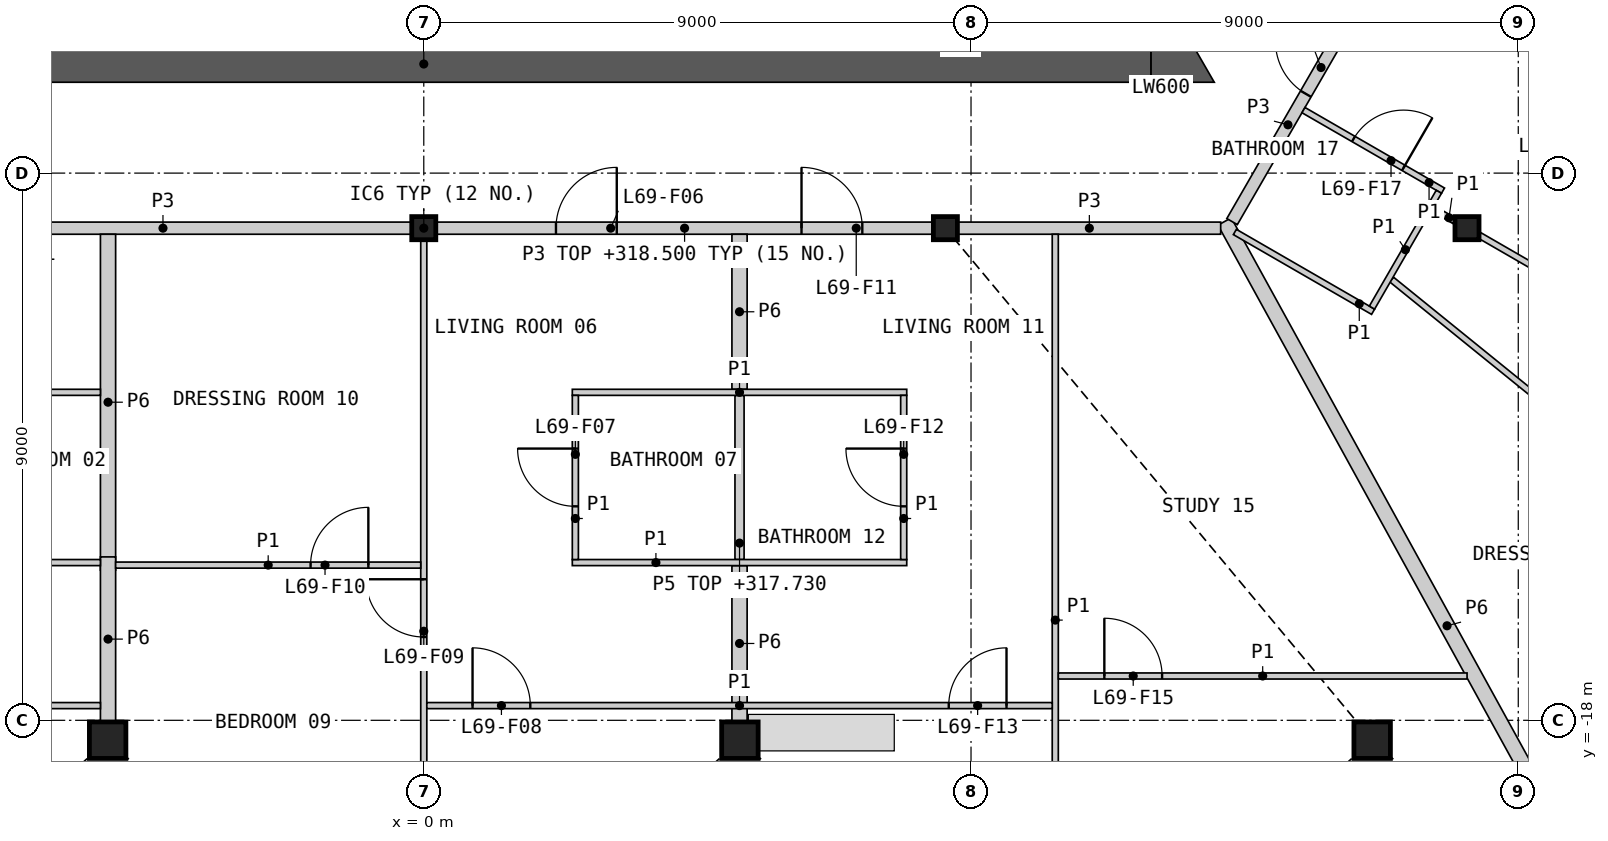
"""IFC4 building model, lengths in metres.
Left out: names, types, materials, properties, quantities, classifications, styles, units other than length and angle.
Written with IfcOpenShell. Run it as: python <this file> out.ifc"""

import sys

from ifc_helpers import new_model, si_unit, direction, frame, frame_2d, origin, origin_2d, place, context, subcontext, project, spatial, polyline, rectangle, hollow_rectangle, i_section, outline, extrude, element, fill, save


model = new_model("IFC4")
c1 = context("Model", 3, precision=1e-05, world=origin(), true_north=direction((0.0, 1.0)))
c2 = subcontext(c1, "Body", "Model", "MODEL_VIEW")
j1 = project(units=[si_unit("LENGTHUNIT", "METRE"), si_unit("PLANEANGLEUNIT", "RADIAN")], contexts=[c1])
p1 = place(None, origin())
s1 = spatial("IfcSite", under=j1, at=p1, CompositionType="ELEMENT")
p2 = place(p1, origin())
s2 = spatial("IfcBuilding", under=s1, at=p2, CompositionType="ELEMENT")
p3 = place(p2, frame((0.0, 0.0, 315.4)))
s3 = spatial("IfcBuildingStorey", under=s2, at=p3, CompositionType="ELEMENT", Elevation=315.4)
for number, where, z_axis, x_axis in (
    (1, (-5.199, -18.327, 0.0), (0.0, 0.0, 1.0), (1.0, 0.0, 0.0)),
    (2, (5.199, -18.327, 0.0), (0.0, 0.0, 1.0), (1.0, 0.0, 0.0)),
    (3, (15.597, -18.327, 0.0), (0.0, 0.0, 1.0), (1.0, 0.0, 0.0)),
):
    element("IfcColumn", number, at=place(p3, frame(where, z_axis=z_axis, x_axis=x_axis)), inside=s3, PredefinedType="COLUMN", context=c2, shape_type="SweptSolid", body=[
        extrude(hollow_rectangle(XDim=0.6, YDim=0.6, WallThickness=0.04, at=origin_2d()), origin(), (0.0, 0.0, 1.0), 3.4),
    ])
for number, where, z_axis, x_axis in (
    (4, (0.0, -9.906, 0.0), (0.0, 0.0, 1.0), (1.0, 0.0, 0.0)),
    (5, (8.578, -9.906, 0.0), (0.0, 0.0, 1.0), (1.0, 0.0, 0.0)),
    (6, (17.157, -9.906, 0.0), (0.0, 0.0, 1.0), (1.0, 0.0, 0.0)),
):
    element("IfcColumn", number, at=place(p3, frame(where, z_axis=z_axis, x_axis=x_axis)), inside=s3, PredefinedType="COLUMN", context=c2, shape_type="SweptSolid", body=[
        extrude(i_section(OverallWidth=0.396, OverallDepth=0.381, WebThickness=0.019, FlangeThickness=0.03, at=origin_2d()), origin(), (0.0, 0.0, 1.0), 3.4),
    ])
p4 = place(p3, frame((-11.961, -7.206, 0.0), z_axis=(0.0, 0.0, 1.0), x_axis=(1.0, 0.0, 0.0)))
e7 = element("IfcWall", 7, at=p4, inside=s3, PredefinedType="SHEAR", context=c2, shape_type="SweptSolid", body=[
    extrude(rectangle(XDim=23.921, YDim=0.6, at=frame_2d((11.961, 0.0))), origin(), (0.0, 0.0, 1.0), 3.1),
])
p5 = place(p3, origin())
e8 = element("IfcWall", 8, at=p5, inside=s3, PredefinedType="SHEAR", context=c2, shape_type="SweptSolid", body=[
    extrude(outline(polyline([(11.961, -7.506), (11.961, -6.906), (12.48, -6.606), (13.0, -7.506), (11.961, -7.506)])), origin(), (0.0, 0.0, 1.0), 3.1),
])
p6 = place(p3, frame((13.171, -9.796, 0.0), z_axis=(0.0, 0.0, 1.0), x_axis=(0.481999020381, -0.876171755053, 0.0)))
e9 = element("IfcWall", 9, at=p6, inside=s3, PredefinedType="PARTITIONING", context=c2, shape_type="SweptSolid", body=[
    extrude(rectangle(XDim=15.178, YDim=0.25, at=frame_2d((7.589, 0.0))), origin(), (0.0, 0.0, 1.0), 2.33),
])
p7 = place(p3, frame((0.208, -9.906, 0.0), z_axis=(0.0, 0.0, 1.0), x_axis=(1.0, 0.0, 0.0)))
e10 = element("IfcWall", 10, at=p7, inside=s3, PredefinedType="PARTITIONING", context=c2, shape_type="SweptSolid", body=[
    extrude(rectangle(XDim=8.163, YDim=0.2, at=frame_2d((4.082, 0.0))), origin(), (0.0, 0.0, 1.0), 3.1),
])
p8 = place(p7, frame((1.966, 0.0, 0.0)))
e11 = element("IfcOpeningElement", 11, at=p8, cuts=e10, PredefinedType="OPENING", context=c2, shape_type="SweptSolid", body=[
    extrude(rectangle(XDim=1.0, YDim=2.1, at=frame_2d((0.5, 1.05))), frame((0.0, 0.11, 0.0), z_axis=(0.0, -1.0, 0.0), x_axis=(1.0, 0.0, 0.0)), (0.0, 0.0, 1.0), 0.22),
])
p9 = place(p7, frame((6.004, 0.0, 0.0)))
e12 = element("IfcOpeningElement", 12, at=p9, cuts=e10, PredefinedType="OPENING", context=c2, shape_type="SweptSolid", body=[
    extrude(rectangle(XDim=1.0, YDim=2.1, at=frame_2d((0.5, 1.05))), frame((0.0, 0.11, 0.0), z_axis=(0.0, -1.0, 0.0), x_axis=(1.0, 0.0, 0.0)), (0.0, 0.0, 1.0), 0.22),
])
p10 = place(p3, frame((-8.371, -9.906, 0.0), z_axis=(0.0, 0.0, 1.0), x_axis=(1.0, 0.0, 0.0)))
e13 = element("IfcWall", 13, at=p10, inside=s3, PredefinedType="PARTITIONING", context=c2, shape_type="SweptSolid", body=[
    extrude(rectangle(XDim=8.163, YDim=0.2, at=frame_2d((4.082, 0.0))), origin(), (0.0, 0.0, 1.0), 3.1),
])
p11 = place(p10, frame((1.159, 0.0, 0.0)))
e14 = element("IfcOpeningElement", 14, at=p11, cuts=e13, PredefinedType="OPENING", context=c2, shape_type="SweptSolid", body=[
    extrude(rectangle(XDim=1.0, YDim=2.1, at=frame_2d((0.5, 1.05))), frame((0.0, 0.11, 0.0), z_axis=(0.0, -1.0, 0.0), x_axis=(1.0, 0.0, 0.0)), (0.0, 0.0, 1.0), 0.22),
])
p12 = place(p3, frame((-5.193, -15.531, 0.0), z_axis=(0.0, 0.0, 1.0), x_axis=(0.0, 1.0, 0.0)))
e15 = element("IfcWall", 15, at=p12, inside=s3, PredefinedType="PARTITIONING", context=c2, shape_type="SweptSolid", body=[
    extrude(rectangle(XDim=5.525, YDim=0.25, at=frame_2d((2.762, 0.0))), origin(), (0.0, 0.0, 1.0), 2.33),
])
p13 = place(p3, frame((8.786, -9.906, 0.0), z_axis=(0.0, 0.0, 1.0), x_axis=(1.0, 0.0, 0.0)))
e16 = element("IfcWall", 16, at=p13, inside=s3, PredefinedType="PARTITIONING", context=c2, shape_type="SweptSolid", body=[
    extrude(rectangle(XDim=4.32, YDim=0.2, at=frame_2d((2.16, 0.0))), origin(), (0.0, 0.0, 1.0), 3.1),
])
p14 = place(p3, frame((13.293, -9.797, 0.0), z_axis=(0.0, 0.0, 1.0), x_axis=(0.499967746641, 0.866044024469, 0.0)))
e17 = element("IfcWall", 17, at=p14, inside=s3, PredefinedType="PARTITIONING", context=c2, shape_type="SweptSolid", body=[
    extrude(rectangle(XDim=3.676, YDim=0.2, at=frame_2d((1.838, 0.0))), origin(), (0.0, 0.0, 1.0), 3.1),
])
p15 = place(p14, frame((2.426, 0.0, 0.0)))
e18 = element("IfcOpeningElement", 18, at=p15, cuts=e17, PredefinedType="OPENING", context=c2, shape_type="SweptSolid", body=[
    extrude(rectangle(XDim=1.0, YDim=2.1, at=frame_2d((0.5, 1.05))), frame((0.0, 0.11, 0.0), z_axis=(0.0, -1.0, 0.0), x_axis=(1.0, 0.0, 0.0)), (0.0, 0.0, 1.0), 0.22),
])
p16 = place(p3, frame((5.193, -12.556, 0.0), z_axis=(0.0, 0.0, 1.0), x_axis=(0.0, 1.0, 0.0)))
e19 = element("IfcWall", 19, at=p16, inside=s3, PredefinedType="PARTITIONING", context=c2, shape_type="SweptSolid", body=[
    extrude(rectangle(XDim=2.55, YDim=0.25, at=frame_2d((1.275, 0.0))), origin(), (0.0, 0.0, 1.0), 2.33),
])
p17 = place(p3, frame((5.193, -18.017, 0.0), z_axis=(0.0, 0.0, 1.0), x_axis=(0.0, 1.0, 0.0)))
e20 = element("IfcWall", 20, at=p17, inside=s3, PredefinedType="PARTITIONING", context=c2, shape_type="SweptSolid", body=[
    extrude(rectangle(XDim=2.561, YDim=0.25, at=frame_2d((1.281, 0.0))), origin(), (0.0, 0.0, 1.0), 2.33),
])
p18 = place(p3, frame((-5.193, -18.017, 0.0), z_axis=(0.0, 0.0, 1.0), x_axis=(0.0, 1.0, 0.0)))
e21 = element("IfcWall", 21, at=p18, inside=s3, PredefinedType="PARTITIONING", context=c2, shape_type="SweptSolid", body=[
    extrude(rectangle(XDim=2.705, YDim=0.25, at=frame_2d((1.352, 0.0))), origin(), (0.0, 0.0, 1.0), 2.33),
])
p19 = place(p3, frame((5.193, -15.356, 0.0), z_axis=(0.0, 0.0, 1.0), x_axis=(0.0, 1.0, 0.0)))
e22 = element("IfcWall", 22, at=p19, inside=s3, PredefinedType="PLUMBINGWALL", context=c2, shape_type="SweptSolid", body=[
    extrude(rectangle(XDim=2.7, YDim=0.15, at=frame_2d((1.35, 0.0))), origin(), (0.0, 0.0, 1.0), 2.33),
])
p20 = place(p3, frame((15.917, -10.751, 0.0), z_axis=(0.0, 0.0, 1.0), x_axis=(0.777149866095, -0.629315569193, 0.0)))
e23 = element("IfcWall", 23, at=p20, inside=s3, PredefinedType="PARTITIONING", context=c2, shape_type="SweptSolid", body=[
    extrude(rectangle(XDim=12.927, YDim=0.1, at=frame_2d((6.464, 0.0))), origin(), (0.0, 0.0, 1.0), 2.33),
])
p21 = place(p20, frame((7.298, 0.0, 0.0)))
e24 = element("IfcOpeningElement", 24, at=p21, cuts=e23, PredefinedType="OPENING", context=c2, shape_type="SweptSolid", body=[
    extrude(rectangle(XDim=0.95, YDim=2.1, at=frame_2d((0.475, 1.05))), frame((0.0, 0.06, 0.0), z_axis=(0.0, -1.0, 0.0), x_axis=(1.0, 0.0, 0.0)), (0.0, 0.0, 1.0), 0.12),
])
p22 = place(p3, frame((10.385, -22.698, 0.0), z_axis=(0.0, 0.0, 1.0), x_axis=(0.0, 1.0, 0.0)))
e25 = element("IfcWall", 25, at=p22, inside=s3, PredefinedType="PARTITIONING", context=c2, shape_type="SweptSolid", body=[
    extrude(rectangle(XDim=12.692, YDim=0.1, at=frame_2d((6.346, 0.0))), origin(), (0.0, 0.0, 1.0), 2.33),
])
p23 = place(p22, frame((1.153, 0.0, 0.0)))
e26 = element("IfcOpeningElement", 26, at=p23, cuts=e25, PredefinedType="OPENING", context=c2, shape_type="SweptSolid", body=[
    extrude(rectangle(XDim=0.95, YDim=2.1, at=frame_2d((0.475, 1.05))), frame((0.0, 0.06, 0.0), z_axis=(0.0, -1.0, 0.0), x_axis=(1.0, 0.0, 0.0)), (0.0, 0.0, 1.0), 0.12),
])
p24 = place(p3, frame((0.0, -22.698, 0.0), z_axis=(0.0, 0.0, 1.0), x_axis=(0.0, 1.0, 0.0)))
e27 = element("IfcWall", 27, at=p24, inside=s3, PredefinedType="PARTITIONING", context=c2, shape_type="SweptSolid", body=[
    extrude(rectangle(XDim=12.585, YDim=0.1, at=frame_2d((6.292, 0.0))), origin(), (0.0, 0.0, 1.0), 2.33),
])
p25 = place(p24, frame((6.068, 0.0, 0.0)))
e28 = element("IfcOpeningElement", 28, at=p25, cuts=e27, PredefinedType="OPENING", context=c2, shape_type="SweptSolid", body=[
    extrude(rectangle(XDim=0.95, YDim=2.1, at=frame_2d((0.475, 1.05))), frame((0.0, 0.06, 0.0), z_axis=(0.0, -1.0, 0.0), x_axis=(1.0, 0.0, 0.0)), (0.0, 0.0, 1.0), 0.12),
])
p26 = place(p3, frame((17.365, -10.025, 0.0), z_axis=(0.0, 0.0, 1.0), x_axis=(0.866021046153, -0.500007547564, 0.0)))
e29 = element("IfcWall", 29, at=p26, inside=s3, PredefinedType="PARTITIONING", context=c2, shape_type="SweptSolid", body=[
    extrude(rectangle(XDim=11.267, YDim=0.1, at=frame_2d((5.634, 0.0))), origin(), (0.0, 0.0, 1.0), 2.33),
])
p27 = place(p26, frame((8.364, 0.0, 0.0)))
e30 = element("IfcOpeningElement", 30, at=p27, cuts=e29, PredefinedType="OPENING", context=c2, shape_type="SweptSolid", body=[
    extrude(rectangle(XDim=0.95, YDim=2.1, at=frame_2d((0.475, 1.05))), frame((0.0, 0.06, 0.0), z_axis=(0.0, -1.0, 0.0), x_axis=(1.0, 0.0, 0.0)), (0.0, 0.0, 1.0), 0.12),
])
p28 = place(p3, frame((0.05, -17.758, 0.0), z_axis=(0.0, 0.0, 1.0), x_axis=(1.0, 0.0, 0.0)))
e31 = element("IfcWall", 31, at=p28, inside=s3, PredefinedType="PARTITIONING", context=c2, shape_type="SweptSolid", body=[
    extrude(rectangle(XDim=10.286, YDim=0.1, at=frame_2d((5.143, 0.0))), origin(), (0.0, 0.0, 1.0), 2.33),
])
p29 = place(p28, frame((0.752, 0.0, 0.0)))
e32 = element("IfcOpeningElement", 32, at=p29, cuts=e31, PredefinedType="OPENING", context=c2, shape_type="SweptSolid", body=[
    extrude(rectangle(XDim=0.95, YDim=2.1, at=frame_2d((0.475, 1.05))), frame((0.0, 0.06, 0.0), z_axis=(0.0, -1.0, 0.0), x_axis=(1.0, 0.0, 0.0)), (0.0, 0.0, 1.0), 0.12),
])
p30 = place(p28, frame((8.584, 0.0, 0.0)))
e33 = element("IfcOpeningElement", 33, at=p30, cuts=e31, PredefinedType="OPENING", context=c2, shape_type="SweptSolid", body=[
    extrude(rectangle(XDim=0.95, YDim=2.1, at=frame_2d((0.475, 1.05))), frame((0.0, 0.06, 0.0), z_axis=(0.0, -1.0, 0.0), x_axis=(1.0, 0.0, 0.0)), (0.0, 0.0, 1.0), 0.12),
])
p31 = place(p3, frame((10.436, -17.271, 0.0), z_axis=(0.0, 0.0, 1.0), x_axis=(1.0, 0.0, 0.0)))
e34 = element("IfcWall", 34, at=p31, inside=s3, PredefinedType="PARTITIONING", context=c2, shape_type="SweptSolid", body=[
    extrude(rectangle(XDim=6.722, YDim=0.1, at=frame_2d((3.361, 0.0))), origin(), (0.0, 0.0, 1.0), 2.33),
])
p32 = place(p31, frame((0.757, 0.0, 0.0)))
e35 = element("IfcOpeningElement", 35, at=p32, cuts=e34, PredefinedType="OPENING", context=c2, shape_type="SweptSolid", body=[
    extrude(rectangle(XDim=0.95, YDim=2.1, at=frame_2d((0.475, 1.05))), frame((0.0, 0.06, 0.0), z_axis=(0.0, -1.0, 0.0), x_axis=(1.0, 0.0, 0.0)), (0.0, 0.0, 1.0), 0.12),
])
for number, where, z_axis, x_axis in (
    (36, (2.443, -12.606, 0.0), (0.0, 0.0, 1.0), (1.0, 0.0, 0.0)),
    (37, (2.443, -15.406, 0.0), (0.0, 0.0, 1.0), (1.0, 0.0, 0.0)),
):
    element("IfcWall", number, at=place(p3, frame(where, z_axis=z_axis, x_axis=x_axis)), inside=s3, PredefinedType="PARTITIONING", context=c2, shape_type="SweptSolid", body=[
        extrude(rectangle(XDim=5.5, YDim=0.1, at=frame_2d((2.75, 0.0))), origin(), (0.0, 0.0, 1.0), 2.33),
    ])
p33 = place(p3, frame((-10.336, -17.758, 0.0), z_axis=(0.0, 0.0, 1.0), x_axis=(1.0, 0.0, 0.0)))
e38 = element("IfcWall", 38, at=p33, inside=s3, PredefinedType="PARTITIONING", context=c2, shape_type="SweptSolid", body=[
    extrude(rectangle(XDim=5.018, YDim=0.1, at=frame_2d((2.509, 0.0))), origin(), (0.0, 0.0, 1.0), 2.33),
])
p34 = place(p33, frame((0.76, 0.0, 0.0)))
e39 = element("IfcOpeningElement", 39, at=p34, cuts=e38, PredefinedType="OPENING", context=c2, shape_type="SweptSolid", body=[
    extrude(rectangle(XDim=0.95, YDim=2.1, at=frame_2d((0.475, 1.05))), frame((0.0, 0.06, 0.0), z_axis=(0.0, -1.0, 0.0), x_axis=(1.0, 0.0, 0.0)), (0.0, 0.0, 1.0), 0.12),
])
p35 = place(p3, frame((-5.068, -15.447, 0.0), z_axis=(0.0, 0.0, 1.0), x_axis=(1.0, 0.0, 0.0)))
e40 = element("IfcWall", 40, at=p35, inside=s3, PredefinedType="PARTITIONING", context=c2, shape_type="SweptSolid", body=[
    extrude(rectangle(XDim=5.018, YDim=0.1, at=frame_2d((2.509, 0.0))), origin(), (0.0, 0.0, 1.0), 2.33),
])
p36 = place(p35, frame((3.206, 0.0, 0.0)))
e41 = element("IfcOpeningElement", 41, at=p36, cuts=e40, PredefinedType="OPENING", context=c2, shape_type="SweptSolid", body=[
    extrude(rectangle(XDim=0.95, YDim=2.1, at=frame_2d((0.475, 1.05))), frame((0.0, 0.06, 0.0), z_axis=(0.0, -1.0, 0.0), x_axis=(1.0, 0.0, 0.0)), (0.0, 0.0, 1.0), 0.12),
])
p37 = place(p3, frame((2.493, -15.356, 0.0), z_axis=(0.0, 0.0, 1.0), x_axis=(0.0, 1.0, 0.0)))
e42 = element("IfcWall", 42, at=p37, inside=s3, PredefinedType="PARTITIONING", context=c2, shape_type="SweptSolid", body=[
    extrude(rectangle(XDim=2.7, YDim=0.1, at=frame_2d((1.35, 0.0))), origin(), (0.0, 0.0, 1.0), 2.33),
])
p38 = place(p37, frame((0.875, 0.0, 0.0)))
e43 = element("IfcOpeningElement", 43, at=p38, cuts=e42, PredefinedType="OPENING", context=c2, shape_type="SweptSolid", body=[
    extrude(rectangle(XDim=0.95, YDim=2.1, at=frame_2d((0.475, 1.05))), frame((0.0, 0.06, 0.0), z_axis=(0.0, -1.0, 0.0), x_axis=(1.0, 0.0, 0.0)), (0.0, 0.0, 1.0), 0.12),
])
p39 = place(p3, frame((7.893, -15.356, 0.0), z_axis=(0.0, 0.0, 1.0), x_axis=(0.0, 1.0, 0.0)))
e44 = element("IfcWall", 44, at=p39, inside=s3, PredefinedType="PARTITIONING", context=c2, shape_type="SweptSolid", body=[
    extrude(rectangle(XDim=2.7, YDim=0.1, at=frame_2d((1.35, 0.0))), origin(), (0.0, 0.0, 1.0), 2.33),
])
p40 = place(p39, frame((0.875, 0.0, 0.0)))
e45 = element("IfcOpeningElement", 45, at=p40, cuts=e44, PredefinedType="OPENING", context=c2, shape_type="SweptSolid", body=[
    extrude(rectangle(XDim=0.95, YDim=2.1, at=frame_2d((0.475, 1.05))), frame((0.0, 0.06, 0.0), z_axis=(0.0, -1.0, 0.0), x_axis=(1.0, 0.0, 0.0)), (0.0, 0.0, 1.0), 0.12),
])
p41 = place(p3, frame((14.468, -7.964, 0.0), z_axis=(0.0, 0.0, 1.0), x_axis=(0.865989200783, -0.500062700197, 0.0)))
e46 = element("IfcWall", 46, at=p41, inside=s3, PredefinedType="PARTITIONING", context=c2, shape_type="SweptSolid", body=[
    extrude(rectangle(XDim=2.65, YDim=0.1, at=frame_2d((1.325, 0.0))), origin(), (0.0, 0.0, 1.0), 2.33),
])
p42 = place(p41, frame((0.95, 0.0, 0.0)))
e47 = element("IfcOpeningElement", 47, at=p42, cuts=e46, PredefinedType="OPENING", context=c2, shape_type="SweptSolid", body=[
    extrude(rectangle(XDim=0.95, YDim=2.1, at=frame_2d((0.475, 1.05))), frame((0.0, 0.06, 0.0), z_axis=(0.0, -1.0, 0.0), x_axis=(1.0, 0.0, 0.0)), (0.0, 0.0, 1.0), 0.12),
])
p43 = place(p3, frame((13.339, -9.968, 0.0), z_axis=(0.0, 0.0, 1.0), x_axis=(0.866013657776, -0.500020344131, 0.0)))
e48 = element("IfcWall", 48, at=p43, inside=s3, PredefinedType="PARTITIONING", context=c2, shape_type="SweptSolid", body=[
    extrude(rectangle(XDim=2.625, YDim=0.1, at=frame_2d((1.312, 0.0))), origin(), (0.0, 0.0, 1.0), 2.33),
])
for number, where, z_axis, x_axis in (
    (49, (-7.843, -12.606, 0.0), (0.0, 0.0, 1.0), (1.0, 0.0, 0.0)),
    (50, (-7.843, -15.406, 0.0), (0.0, 0.0, 1.0), (1.0, 0.0, 0.0)),
):
    element("IfcWall", number, at=place(p3, frame(where, z_axis=z_axis, x_axis=x_axis)), inside=s3, PredefinedType="PARTITIONING", context=c2, shape_type="SweptSolid", body=[
        extrude(rectangle(XDim=2.525, YDim=0.1, at=frame_2d((1.262, 0.0))), origin(), (0.0, 0.0, 1.0), 2.33),
    ])
p44 = place(p3, frame((15.594, -11.212, 0.0), z_axis=(0.0, 0.0, 1.0), x_axis=(0.499981787252, 0.866035918664, 0.0)))
e51 = element("IfcWall", 51, at=p44, inside=s3, PredefinedType="PARTITIONING", context=c2, shape_type="SweptSolid", body=[
    extrude(rectangle(XDim=2.2, YDim=0.1, at=frame_2d((1.1, 0.0))), origin(), (0.0, 0.0, 1.0), 2.33),
])
p45 = place(p3, frame((16.594, -9.581, 0.0), z_axis=(0.0, 0.0, 1.0), x_axis=(0.866036909293, -0.499980071345, 0.0)))
e52 = element("IfcWall", 52, at=p45, inside=s3, PredefinedType="PARTITIONING", context=c2, shape_type="SweptSolid", body=[
    extrude(rectangle(XDim=0.41, YDim=0.1, at=frame_2d((0.205, 0.0))), origin(), (0.0, 0.0, 1.0), 2.33),
])
p46 = place(p8, origin())
e53 = element("IfcDoor", 53, at=p46, inside=s3, OperationType="SINGLE_SWING_RIGHT", PredefinedType="DOOR", context=c2, shape_type="SweptSolid", body=[
    extrude(rectangle(XDim=1.0, YDim=2.1, at=frame_2d((0.5, 1.05))), frame((0.0, 0.025, 0.0), z_axis=(0.0, -1.0, 0.0), x_axis=(1.0, 0.0, 0.0)), (0.0, 0.0, 1.0), 0.05),
])
fill(e11, e53)
p47 = place(p38, origin())
e54 = element("IfcDoor", 54, at=p47, inside=s3, OperationType="SINGLE_SWING_RIGHT", PredefinedType="DOOR", context=c2, shape_type="SweptSolid", body=[
    extrude(rectangle(XDim=0.95, YDim=2.1, at=frame_2d((0.475, 1.05))), frame((0.0, 0.025, 0.0), z_axis=(0.0, -1.0, 0.0), x_axis=(1.0, 0.0, 0.0)), (0.0, 0.0, 1.0), 0.05),
])
fill(e43, e54)
p48 = place(p29, origin())
e55 = element("IfcDoor", 55, at=p48, inside=s3, OperationType="SINGLE_SWING_LEFT", PredefinedType="DOOR", context=c2, shape_type="SweptSolid", body=[
    extrude(rectangle(XDim=0.95, YDim=2.1, at=frame_2d((0.475, 1.05))), frame((0.0, 0.025, 0.0), z_axis=(0.0, -1.0, 0.0), x_axis=(1.0, 0.0, 0.0)), (0.0, 0.0, 1.0), 0.05),
])
fill(e32, e55)
p49 = place(p25, origin())
e56 = element("IfcDoor", 56, at=p49, inside=s3, OperationType="SINGLE_SWING_RIGHT", PredefinedType="DOOR", context=c2, shape_type="SweptSolid", body=[
    extrude(rectangle(XDim=0.95, YDim=2.1, at=frame_2d((0.475, 1.05))), frame((0.0, 0.025, 0.0), z_axis=(0.0, -1.0, 0.0), x_axis=(1.0, 0.0, 0.0)), (0.0, 0.0, 1.0), 0.05),
])
fill(e28, e56)
p50 = place(p36, origin())
e57 = element("IfcDoor", 57, at=p50, inside=s3, OperationType="SINGLE_SWING_RIGHT", PredefinedType="DOOR", context=c2, shape_type="SweptSolid", body=[
    extrude(rectangle(XDim=0.95, YDim=2.1, at=frame_2d((0.475, 1.05))), frame((0.0, 0.025, 0.0), z_axis=(0.0, -1.0, 0.0), x_axis=(1.0, 0.0, 0.0)), (0.0, 0.0, 1.0), 0.05),
])
fill(e41, e57)
p51 = place(p9, origin())
e58 = element("IfcDoor", 58, at=p51, inside=s3, OperationType="SINGLE_SWING_LEFT", PredefinedType="DOOR", context=c2, shape_type="SweptSolid", body=[
    extrude(rectangle(XDim=1.0, YDim=2.1, at=frame_2d((0.5, 1.05))), frame((0.0, 0.025, 0.0), z_axis=(0.0, -1.0, 0.0), x_axis=(1.0, 0.0, 0.0)), (0.0, 0.0, 1.0), 0.05),
])
fill(e12, e58)
p52 = place(p40, origin())
e59 = element("IfcDoor", 59, at=p52, inside=s3, OperationType="SINGLE_SWING_RIGHT", PredefinedType="DOOR", context=c2, shape_type="SweptSolid", body=[
    extrude(rectangle(XDim=0.95, YDim=2.1, at=frame_2d((0.475, 1.05))), frame((0.0, 0.025, 0.0), z_axis=(0.0, -1.0, 0.0), x_axis=(1.0, 0.0, 0.0)), (0.0, 0.0, 1.0), 0.05),
])
fill(e45, e59)
p53 = place(p30, origin())
e60 = element("IfcDoor", 60, at=p53, inside=s3, OperationType="SINGLE_SWING_RIGHT", PredefinedType="DOOR", context=c2, shape_type="SweptSolid", body=[
    extrude(rectangle(XDim=0.95, YDim=2.1, at=frame_2d((0.475, 1.05))), frame((0.0, 0.025, 0.0), z_axis=(0.0, -1.0, 0.0), x_axis=(1.0, 0.0, 0.0)), (0.0, 0.0, 1.0), 0.05),
])
fill(e33, e60)
p54 = place(p32, origin())
e61 = element("IfcDoor", 61, at=p54, inside=s3, OperationType="SINGLE_SWING_LEFT", PredefinedType="DOOR", context=c2, shape_type="SweptSolid", body=[
    extrude(rectangle(XDim=0.95, YDim=2.1, at=frame_2d((0.475, 1.05))), frame((0.0, 0.025, 0.0), z_axis=(0.0, -1.0, 0.0), x_axis=(1.0, 0.0, 0.0)), (0.0, 0.0, 1.0), 0.05),
])
fill(e35, e61)
p55 = place(p15, origin())
e62 = element("IfcDoor", 62, at=p55, inside=s3, OperationType="SINGLE_SWING_RIGHT", PredefinedType="DOOR", context=c2, shape_type="SweptSolid", body=[
    extrude(rectangle(XDim=1.0, YDim=2.1, at=frame_2d((0.5, 1.05))), frame((0.0, 0.025, 0.0), z_axis=(0.0, -1.0, 0.0), x_axis=(1.0, 0.0, 0.0)), (0.0, 0.0, 1.0), 0.05),
])
fill(e18, e62)
p56 = place(p42, origin())
e63 = element("IfcDoor", 63, at=p56, inside=s3, OperationType="SINGLE_SWING_RIGHT", PredefinedType="DOOR", context=c2, shape_type="SweptSolid", body=[
    extrude(rectangle(XDim=0.95, YDim=2.1, at=frame_2d((0.475, 1.05))), frame((0.0, 0.025, 0.0), z_axis=(0.0, -1.0, 0.0), x_axis=(1.0, 0.0, 0.0)), (0.0, 0.0, 1.0), 0.05),
])
fill(e47, e63)
save(model, sys.argv[1])
